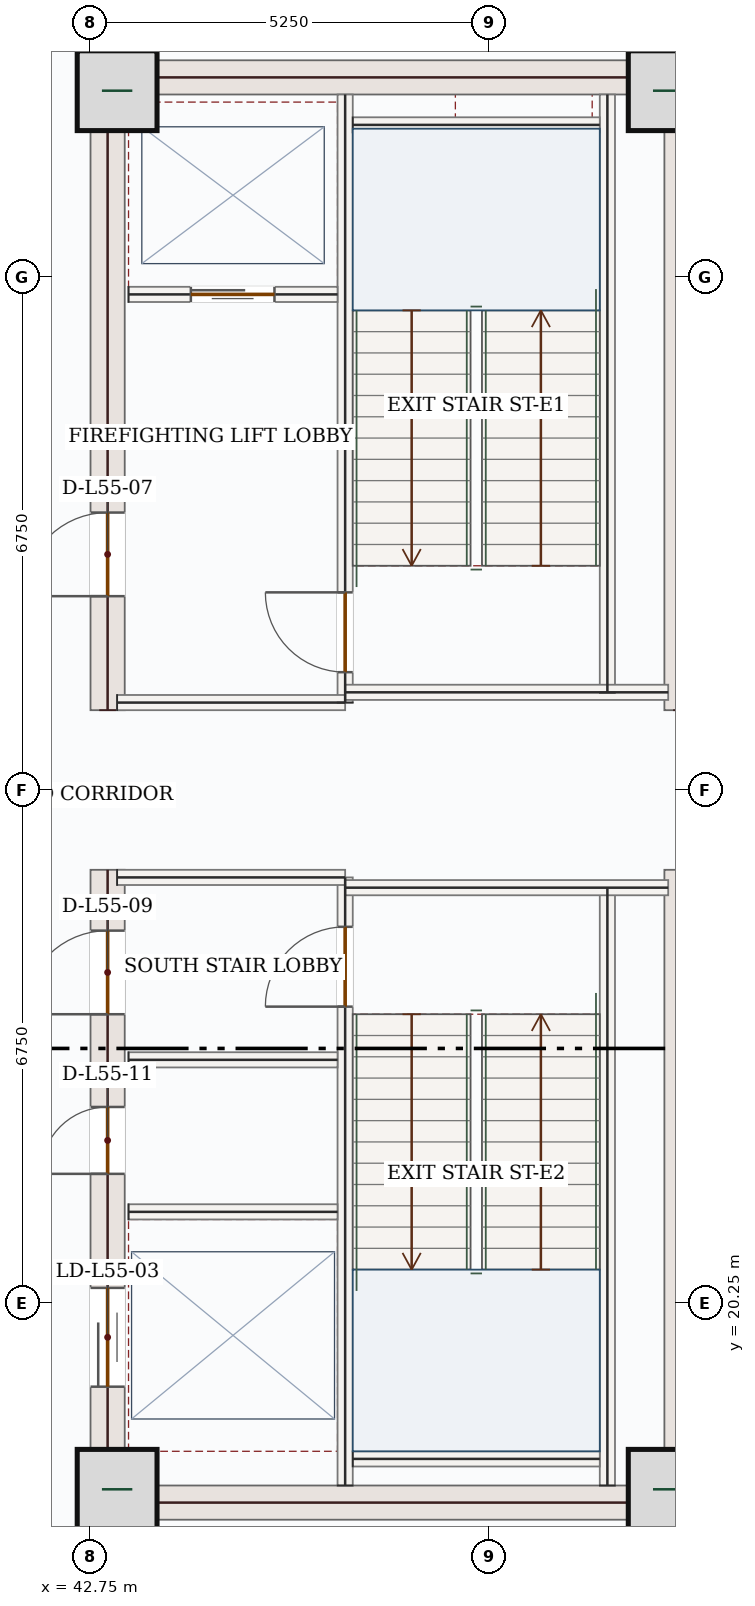
"""IFC4 building model, lengths in metres.
Left out: names, types, materials, properties, quantities, classifications, styles, units other than length and angle.
Written with IfcOpenShell. Run it as: python <this file> out.ifc"""

import sys

from ifc_helpers import new_model, si_unit, direction, frame, frame_2d, origin, origin_2d, place, context, subcontext, project, spatial, rectangle, extrude, source, transform, mapped, element, fill, save


model = new_model("IFC4")
c1 = context("Model", 3, precision=1e-05, world=origin(), true_north=direction((0.0, 1.0)))
c2 = subcontext(c1, "Body", "Model", "MODEL_VIEW")
j1 = project(units=[si_unit("LENGTHUNIT", "METRE"), si_unit("PLANEANGLEUNIT", "RADIAN")], contexts=[c1])
p1 = place(None, origin())
s1 = spatial("IfcSite", under=j1, at=p1, CompositionType="ELEMENT")
p2 = place(p1, origin())
s2 = spatial("IfcBuilding", under=s1, at=p2, CompositionType="ELEMENT")
p3 = place(p2, frame((0.0, 0.0, 234.3)))
s3 = spatial("IfcBuildingStorey", under=s2, at=p3, CompositionType="ELEMENT", Elevation=234.3)
p4 = place(p3, frame((42.975, 17.4, 0.0), z_axis=(0.0, 0.0, 1.0), x_axis=(0.0, 1.0, 0.0)))
e1 = element("IfcWall", 1, at=p4, inside=s3, PredefinedType="SHEAR", context=c2, shape_type="SweptSolid", body=[
    extrude(rectangle(XDim=8.55, YDim=0.45, at=frame_2d((4.275, 0.0))), origin(), (0.0, 0.0, 1.0), 4.55),
])
p5 = place(p4, frame((6.65, 0.0, 0.0)))
e2 = element("IfcOpeningElement", 2, at=p5, cuts=e1, PredefinedType="OPENING", context=c2, shape_type="SweptSolid", body=[
    extrude(rectangle(XDim=1.1, YDim=2.2, at=frame_2d((0.55, 1.1))), frame((0.0, 0.235, 0.0), z_axis=(0.0, -1.0, 0.0), x_axis=(1.0, 0.0, 0.0)), (0.0, 0.0, 1.0), 0.47),
])
p6 = place(p4, frame((1.75, 0.0, 0.0)))
e3 = element("IfcOpeningElement", 3, at=p6, cuts=e1, PredefinedType="OPENING", context=c2, shape_type="SweptSolid", body=[
    extrude(rectangle(XDim=1.3, YDim=2.2, at=frame_2d((0.65, 1.1))), frame((0.0, 0.235, 0.0), z_axis=(0.0, -1.0, 0.0), x_axis=(1.0, 0.0, 0.0)), (0.0, 0.0, 1.0), 0.47),
])
p7 = place(p4, frame((4.55, 0.0, 0.0)))
e4 = element("IfcOpeningElement", 4, at=p7, cuts=e1, PredefinedType="OPENING", context=c2, shape_type="SweptSolid", body=[
    extrude(rectangle(XDim=0.88, YDim=2.1, at=frame_2d((0.44, 1.05))), frame((0.0, 0.235, 0.0), z_axis=(0.0, -1.0, 0.0), x_axis=(1.0, 0.0, 0.0)), (0.0, 0.0, 1.0), 0.47),
])
p8 = place(p3, frame((42.975, 28.05, 0.0), z_axis=(0.0, 0.0, 1.0), x_axis=(0.0, 1.0, 0.0)))
e5 = element("IfcWall", 5, at=p8, inside=s3, PredefinedType="SHEAR", context=c2, shape_type="SweptSolid", body=[
    extrude(rectangle(XDim=8.55, YDim=0.45, at=frame_2d((4.275, 0.0))), origin(), (0.0, 0.0, 1.0), 4.55),
])
p9 = place(p8, frame((1.5, 0.0, 0.0)))
e6 = element("IfcOpeningElement", 6, at=p9, cuts=e5, PredefinedType="OPENING", context=c2, shape_type="SweptSolid", body=[
    extrude(rectangle(XDim=1.1, YDim=2.2, at=frame_2d((0.55, 1.1))), frame((0.0, 0.235, 0.0), z_axis=(0.0, -1.0, 0.0), x_axis=(1.0, 0.0, 0.0)), (0.0, 0.0, 1.0), 0.47),
])
m1 = source(origin(), c2, "Body", "SweptSolid", [
    extrude(rectangle(XDim=8.55, YDim=0.45, at=frame_2d((4.275, 0.0))), origin(), (0.0, 0.0, 1.0), 4.55),
])
for number, where, z_axis, x_axis in (
    (7, (50.525, 17.4, 0.0), (0.0, 0.0, 1.0), (0.0, 1.0, 0.0)),
    (8, (50.525, 28.05, 0.0), (0.0, 0.0, 1.0), (0.0, 1.0, 0.0)),
):
    element("IfcWall", number, at=place(p3, frame(where, z_axis=z_axis, x_axis=x_axis)), inside=s3, PredefinedType="SHEAR", context=c2, shape_type="MappedRepresentation", body=[
        mapped(m1, transform((0.0, 0.0, 0.0), x_axis=(1.0, 0.0, 0.0), y_axis=(0.0, 1.0, 0.0), z_axis=(0.0, 0.0, 1.0), scale=1.0)),
    ])
m2 = source(origin(), c2, "Body", "SweptSolid", [
    extrude(rectangle(XDim=7.1, YDim=0.45, at=frame_2d((3.55, 0.0))), origin(), (0.0, 0.0, 1.0), 4.55),
])
for number, where, z_axis, x_axis in (
    (9, (43.2, 17.625, 0.0), (0.0, 0.0, 1.0), (1.0, 0.0, 0.0)),
    (10, (43.2, 36.375, 0.0), (0.0, 0.0, 1.0), (1.0, 0.0, 0.0)),
):
    element("IfcWall", number, at=place(p3, frame(where, z_axis=z_axis, x_axis=x_axis)), inside=s3, PredefinedType="SHEAR", context=c2, shape_type="MappedRepresentation", body=[
        mapped(m2, transform((0.0, 0.0, 0.0), x_axis=(1.0, 0.0, 0.0), y_axis=(0.0, 1.0, 0.0), z_axis=(0.0, 0.0, 1.0), scale=1.0)),
    ])
m3 = source(origin(), c2, "Body", "SweptSolid", [
    extrude(rectangle(XDim=1.05, YDim=1.05, at=origin_2d()), origin(), (0.0, 0.0, 1.0), 4.8),
])
for number, where, z_axis, x_axis in (
    (11, (43.1, 17.8, 0.0), (0.0, 0.0, 1.0), (1.0, 0.0, 0.0)),
    (12, (50.35, 17.8, 0.0), (0.0, 0.0, 1.0), (1.0, 0.0, 0.0)),
    (13, (43.1, 36.2, 0.0), (0.0, 0.0, 1.0), (1.0, 0.0, 0.0)),
    (14, (50.35, 36.2, 0.0), (0.0, 0.0, 1.0), (1.0, 0.0, 0.0)),
):
    element("IfcColumn", number, at=place(p3, frame(where, z_axis=z_axis, x_axis=x_axis)), inside=s3, PredefinedType="COLUMN", context=c2, shape_type="MappedRepresentation", body=[
        mapped(m3, transform((0.0, 0.0, 0.0), x_axis=(1.0, 0.0, 0.0), y_axis=(0.0, 1.0, 0.0), z_axis=(0.0, 0.0, 1.0), scale=1.0)),
    ])
p10 = place(p3, frame((53.06, 18.458, 0.0), z_axis=(0.0, 0.0, 1.0), x_axis=(-0.707106781187, -0.707106781187, 0.0)))
e15 = element("IfcWall", 15, at=p10, inside=s3, PredefinedType="SOLIDWALL", context=c2, shape_type="SweptSolid", body=[
    extrude(rectangle(XDim=5.258, YDim=0.28, at=frame_2d((2.629, 0.0))), origin(), (0.0, 0.0, 1.0), 4.55),
])
p11 = place(p10, frame((1.729, 0.0, 0.85)))
e16 = element("IfcOpeningElement", 16, at=p11, cuts=e15, PredefinedType="OPENING", context=c2, shape_type="SweptSolid", body=[
    extrude(rectangle(XDim=1.8, YDim=1.75, at=frame_2d((0.9, 0.875))), frame((0.0, 0.15, 0.0), z_axis=(0.0, -1.0, 0.0), x_axis=(1.0, 0.0, 0.0)), (0.0, 0.0, 1.0), 0.3),
])
m4 = source(origin(), c2, "Body", "SweptSolid", [
    extrude(rectangle(XDim=7.87, YDim=0.2, at=frame_2d((3.935, 0.0))), origin(), (0.0, 0.0, 1.0), 4.55),
])
for number, where, z_axis, x_axis in (
    (17, (49.55, 17.85, 0.0), (0.0, 0.0, 1.0), (0.0, 1.0, 0.0)),
    (18, (49.55, 28.28, 0.0), (0.0, 0.0, 1.0), (0.0, 1.0, 0.0)),
):
    element("IfcWall", number, at=place(p3, frame(where, z_axis=z_axis, x_axis=x_axis)), inside=s3, PredefinedType="SOLIDWALL", context=c2, shape_type="MappedRepresentation", body=[
        mapped(m4, transform((0.0, 0.0, 0.0), x_axis=(1.0, 0.0, 0.0), y_axis=(0.0, 1.0, 0.0), z_axis=(0.0, 0.0, 1.0), scale=1.0)),
    ])
p12 = place(p3, frame((46.1, 17.85, 0.0), z_axis=(0.0, 0.0, 1.0), x_axis=(0.0, 1.0, 0.0)))
e19 = element("IfcWall", 19, at=p12, inside=s3, PredefinedType="SOLIDWALL", context=c2, shape_type="SweptSolid", body=[
    extrude(rectangle(XDim=8.0, YDim=0.2, at=frame_2d((4.0, 0.0))), origin(), (0.0, 0.0, 1.0), 4.55),
])
p13 = place(p12, frame((6.3, 0.0, 0.0)))
e20 = element("IfcOpeningElement", 20, at=p13, cuts=e19, PredefinedType="OPENING", context=c2, shape_type="SweptSolid", body=[
    extrude(rectangle(XDim=1.05, YDim=2.15, at=frame_2d((0.525, 1.075))), frame((0.0, 0.11, 0.0), z_axis=(0.0, -1.0, 0.0), x_axis=(1.0, 0.0, 0.0)), (0.0, 0.0, 1.0), 0.22),
])
p14 = place(p3, frame((46.1, 28.15, 0.0), z_axis=(0.0, 0.0, 1.0), x_axis=(0.0, 1.0, 0.0)))
e21 = element("IfcWall", 21, at=p14, inside=s3, PredefinedType="SOLIDWALL", context=c2, shape_type="SweptSolid", body=[
    extrude(rectangle(XDim=8.0, YDim=0.2, at=frame_2d((4.0, 0.0))), origin(), (0.0, 0.0, 1.0), 4.55),
])
p15 = place(p14, frame((0.4, 0.0, 0.0)))
e22 = element("IfcOpeningElement", 22, at=p15, cuts=e21, PredefinedType="OPENING", context=c2, shape_type="SweptSolid", body=[
    extrude(rectangle(XDim=1.05, YDim=2.15, at=frame_2d((0.525, 1.075))), frame((0.0, 0.11, 0.0), z_axis=(0.0, -1.0, 0.0), x_axis=(1.0, 0.0, 0.0)), (0.0, 0.0, 1.0), 0.22),
])
m5 = source(origin(), c2, "Body", "SweptSolid", [
    extrude(rectangle(XDim=3.0, YDim=0.2, at=frame_2d((1.5, 0.0))), origin(), (0.0, 0.0, 1.0), 4.55),
])
p16 = place(p3, frame((43.1, 25.85, 0.0), z_axis=(0.0, 0.0, 1.0), x_axis=(1.0, 0.0, 0.0)))
e23 = element("IfcWall", 23, at=p16, inside=s3, PredefinedType="SOLIDWALL", context=c2, shape_type="MappedRepresentation", body=[
    mapped(m5, transform((0.0, 0.0, 0.0), x_axis=(1.0, 0.0, 0.0), y_axis=(0.0, 1.0, 0.0), z_axis=(0.0, 0.0, 1.0), scale=1.0)),
])
m6 = source(origin(), c2, "Body", "SweptSolid", [
    extrude(rectangle(XDim=4.25, YDim=0.2, at=frame_2d((2.125, 0.0))), origin(), (0.0, 0.0, 1.0), 4.55),
])
p17 = place(p3, frame((46.1, 25.715, 0.0), z_axis=(0.0, 0.0, 1.0), x_axis=(1.0, 0.0, 0.0)))
e24 = element("IfcWall", 24, at=p17, inside=s3, PredefinedType="SOLIDWALL", context=c2, shape_type="MappedRepresentation", body=[
    mapped(m6, transform((0.0, 0.0, 0.0), x_axis=(1.0, 0.0, 0.0), y_axis=(0.0, 1.0, 0.0), z_axis=(0.0, 0.0, 1.0), scale=1.0)),
])
p18 = place(p3, frame((43.1, 28.15, 0.0), z_axis=(0.0, 0.0, 1.0), x_axis=(1.0, 0.0, 0.0)))
e25 = element("IfcWall", 25, at=p18, inside=s3, PredefinedType="SOLIDWALL", context=c2, shape_type="MappedRepresentation", body=[
    mapped(m5, transform((0.0, 0.0, 0.0), x_axis=(1.0, 0.0, 0.0), y_axis=(0.0, 1.0, 0.0), z_axis=(0.0, 0.0, 1.0), scale=1.0)),
])
p19 = place(p3, frame((46.1, 28.285, 0.0), z_axis=(0.0, 0.0, 1.0), x_axis=(1.0, 0.0, 0.0)))
e26 = element("IfcWall", 26, at=p19, inside=s3, PredefinedType="SOLIDWALL", context=c2, shape_type="MappedRepresentation", body=[
    mapped(m6, transform((0.0, 0.0, 0.0), x_axis=(1.0, 0.0, 0.0), y_axis=(0.0, 1.0, 0.0), z_axis=(0.0, 0.0, 1.0), scale=1.0)),
])
m7 = source(origin(), c2, "Body", "SweptSolid", [
    extrude(rectangle(XDim=3.25, YDim=0.2, at=frame_2d((1.625, 0.0))), origin(), (0.0, 0.0, 1.0), 4.55),
])
for number, where, z_axis, x_axis in (
    (27, (46.2, 35.75, 0.0), (0.0, 0.0, 1.0), (1.0, 0.0, 0.0)),
    (28, (46.2, 18.2, 0.0), (0.0, 0.0, 1.0), (1.0, 0.0, 0.0)),
):
    element("IfcWall", number, at=place(p3, frame(where, z_axis=z_axis, x_axis=x_axis)), inside=s3, PredefinedType="SOLIDWALL", context=c2, shape_type="MappedRepresentation", body=[
        mapped(m7, transform((0.0, 0.0, 0.0), x_axis=(1.0, 0.0, 0.0), y_axis=(0.0, 1.0, 0.0), z_axis=(0.0, 0.0, 1.0), scale=1.0)),
    ])
p20 = place(p3, frame((43.25, 33.52, 0.0), z_axis=(0.0, 0.0, 1.0), x_axis=(1.0, 0.0, 0.0)))
e29 = element("IfcWall", 29, at=p20, inside=s3, PredefinedType="SOLIDWALL", context=c2, shape_type="SweptSolid", body=[
    extrude(rectangle(XDim=2.75, YDim=0.2, at=frame_2d((1.375, 0.0))), origin(), (0.0, 0.0, 1.0), 4.55),
])
p21 = place(p20, frame((0.82, 0.0, 0.0)))
e30 = element("IfcOpeningElement", 30, at=p21, cuts=e29, PredefinedType="OPENING", context=c2, shape_type="SweptSolid", body=[
    extrude(rectangle(XDim=1.1, YDim=2.15, at=frame_2d((0.55, 1.075))), frame((0.0, 0.11, 0.0), z_axis=(0.0, -1.0, 0.0), x_axis=(1.0, 0.0, 0.0)), (0.0, 0.0, 1.0), 0.22),
])
m8 = source(origin(), c2, "Body", "SweptSolid", [
    extrude(rectangle(XDim=2.75, YDim=0.2, at=frame_2d((1.375, 0.0))), origin(), (0.0, 0.0, 1.0), 4.55),
])
for number, where, z_axis, x_axis in (
    (31, (43.25, 23.45, 0.0), (0.0, 0.0, 1.0), (1.0, 0.0, 0.0)),
    (32, (43.25, 21.45, 0.0), (0.0, 0.0, 1.0), (1.0, 0.0, 0.0)),
):
    element("IfcWall", number, at=place(p3, frame(where, z_axis=z_axis, x_axis=x_axis)), inside=s3, PredefinedType="SOLIDWALL", context=c2, shape_type="MappedRepresentation", body=[
        mapped(m8, transform((0.0, 0.0, 0.0), x_axis=(1.0, 0.0, 0.0), y_axis=(0.0, 1.0, 0.0), z_axis=(0.0, 0.0, 1.0), scale=1.0)),
    ])
m9 = source(origin(), c2, "Body", "SweptSolid", [
    extrude(rectangle(XDim=1.05, YDim=2.15, at=frame_2d((0.525, 1.075))), frame((0.0, 0.025, 0.0), z_axis=(0.0, -1.0, 0.0), x_axis=(1.0, 0.0, 0.0)), (0.0, 0.0, 1.0), 0.05),
])
p22 = place(p15, origin())
e33 = element("IfcDoor", 33, at=p22, inside=s3, OperationType="SINGLE_SWING_RIGHT", PredefinedType="DOOR", context=c2, shape_type="MappedRepresentation", body=[
    mapped(m9, transform((0.0, 0.0, 0.0), x_axis=(1.0, 0.0, 0.0), y_axis=(0.0, 1.0, 0.0), z_axis=(0.0, 0.0, 1.0), scale=1.0)),
])
fill(e22, e33)
p23 = place(p13, origin())
e34 = element("IfcDoor", 34, at=p23, inside=s3, OperationType="SINGLE_SWING_LEFT", PredefinedType="DOOR", context=c2, shape_type="MappedRepresentation", body=[
    mapped(m9, transform((0.0, 0.0, 0.0), x_axis=(1.0, 0.0, 0.0), y_axis=(0.0, 1.0, 0.0), z_axis=(0.0, 0.0, 1.0), scale=1.0)),
])
fill(e20, e34)
m10 = source(origin(), c2, "Body", "SweptSolid", [
    extrude(rectangle(XDim=1.1, YDim=2.15, at=frame_2d((0.55, 1.075))), frame((0.0, 0.025, 0.0), z_axis=(0.0, -1.0, 0.0), x_axis=(1.0, 0.0, 0.0)), (0.0, 0.0, 1.0), 0.05),
])
p24 = place(p21, origin())
e35 = element("IfcDoor", 35, at=p24, inside=s3, OperationType="DOUBLE_DOOR_SLIDING", PredefinedType="DOOR", context=c2, shape_type="MappedRepresentation", body=[
    mapped(m10, transform((0.0, 0.0, 0.0), x_axis=(1.0, 0.0, 0.0), y_axis=(0.0, 1.0, 0.0), z_axis=(0.0, 0.0, 1.0), scale=1.0)),
])
fill(e30, e35)
m11 = source(origin(), c2, "Body", "SweptSolid", [
    extrude(rectangle(XDim=1.1, YDim=2.2, at=frame_2d((0.55, 1.1))), frame((0.0, 0.025, 0.0), z_axis=(0.0, -1.0, 0.0), x_axis=(1.0, 0.0, 0.0)), (0.0, 0.0, 1.0), 0.05),
])
p25 = place(p9, origin())
e36 = element("IfcDoor", 36, at=p25, inside=s3, OperationType="SINGLE_SWING_LEFT", PredefinedType="DOOR", context=c2, shape_type="MappedRepresentation", body=[
    mapped(m11, transform((0.0, 0.0, 0.0), x_axis=(1.0, 0.0, 0.0), y_axis=(0.0, 1.0, 0.0), z_axis=(0.0, 0.0, 1.0), scale=1.0)),
])
fill(e6, e36)
p26 = place(p5, origin())
e37 = element("IfcDoor", 37, at=p26, inside=s3, OperationType="SINGLE_SWING_LEFT", PredefinedType="DOOR", context=c2, shape_type="MappedRepresentation", body=[
    mapped(m11, transform((0.0, 0.0, 0.0), x_axis=(1.0, 0.0, 0.0), y_axis=(0.0, 1.0, 0.0), z_axis=(0.0, 0.0, 1.0), scale=1.0)),
])
fill(e2, e37)
m12 = source(origin(), c2, "Body", "SweptSolid", [
    extrude(rectangle(XDim=1.3, YDim=2.2, at=frame_2d((0.65, 1.1))), frame((0.0, 0.025, 0.0), z_axis=(0.0, -1.0, 0.0), x_axis=(1.0, 0.0, 0.0)), (0.0, 0.0, 1.0), 0.05),
])
p27 = place(p6, origin())
e38 = element("IfcDoor", 38, at=p27, inside=s3, OperationType="DOUBLE_DOOR_SLIDING", PredefinedType="DOOR", context=c2, shape_type="MappedRepresentation", body=[
    mapped(m12, transform((0.0, 0.0, 0.0), x_axis=(1.0, 0.0, 0.0), y_axis=(0.0, 1.0, 0.0), z_axis=(0.0, 0.0, 1.0), scale=1.0)),
])
fill(e3, e38)
m13 = source(origin(), c2, "Body", "SweptSolid", [
    extrude(rectangle(XDim=0.88, YDim=2.1, at=frame_2d((0.44, 1.05))), frame((0.0, 0.025, 0.0), z_axis=(0.0, -1.0, 0.0), x_axis=(1.0, 0.0, 0.0)), (0.0, 0.0, 1.0), 0.05),
])
p28 = place(p7, origin())
e39 = element("IfcDoor", 39, at=p28, inside=s3, OperationType="SINGLE_SWING_LEFT", PredefinedType="DOOR", context=c2, shape_type="MappedRepresentation", body=[
    mapped(m13, transform((0.0, 0.0, 0.0), x_axis=(1.0, 0.0, 0.0), y_axis=(0.0, 1.0, 0.0), z_axis=(0.0, 0.0, 1.0), scale=1.0)),
])
fill(e4, e39)
save(model, sys.argv[1])
